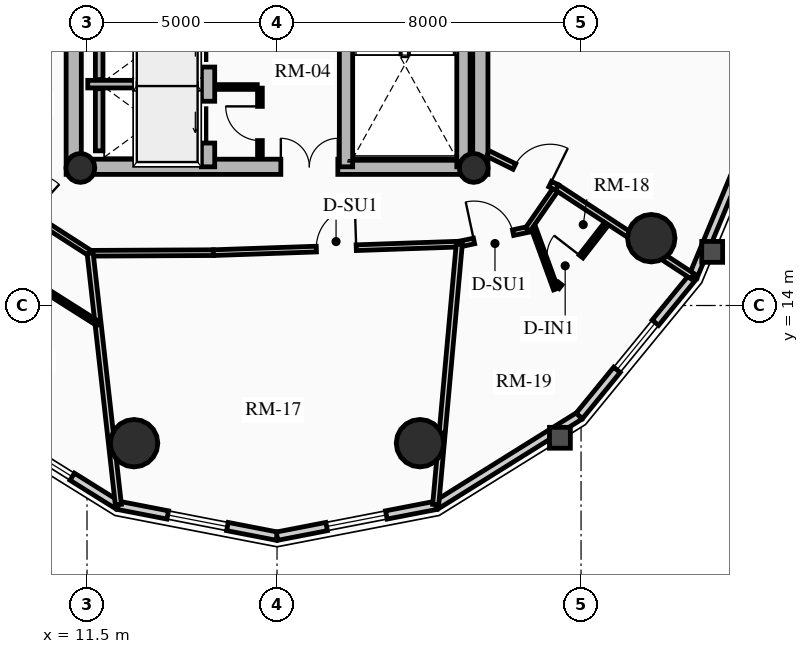
"""IFC4 building model, lengths in metres.
Left out: names, types, materials, properties, quantities, classifications, styles, units other than length and angle.
Written with IfcOpenShell. Run it as: python <this file> out.ifc"""

import sys

from ifc_helpers import new_model, si_unit, direction, frame, frame_2d, origin, origin_2d, place, context, subcontext, project, spatial, rectangle, circle, hollow_circle, extrude, source, transform, mapped, element, fill, save


model = new_model("IFC4")
c1 = context("Model", 3, precision=1e-05, world=origin(), true_north=direction((0.0, 1.0)))
c2 = subcontext(c1, "Body", "Model", "MODEL_VIEW")
j1 = project(units=[si_unit("LENGTHUNIT", "METRE"), si_unit("PLANEANGLEUNIT", "RADIAN")], contexts=[c1])
p1 = place(None, origin())
s1 = spatial("IfcSite", under=j1, at=p1, CompositionType="ELEMENT")
p2 = place(p1, origin())
s2 = spatial("IfcBuilding", under=s1, at=p2, CompositionType="ELEMENT")
p3 = place(p2, frame((0.0, 0.0, 174.88)))
s3 = spatial("IfcBuildingStorey", under=s2, at=p3, CompositionType="ELEMENT", Elevation=174.88)
for number, where, z_axis, x_axis in (
    (1, (11.15, 17.45, 0.0), (0.0, 0.0, 1.0), (0.0, 1.0, 0.0)),
    (2, (21.85, 17.45, 0.0), (0.0, 0.0, 1.0), (0.0, 1.0, 0.0)),
):
    element("IfcWall", number, at=place(p3, frame(where, z_axis=z_axis, x_axis=x_axis)), inside=s3, PredefinedType="SHEAR", context=c2, shape_type="SweptSolid", body=[
        extrude(rectangle(XDim=14.1, YDim=0.4, at=frame_2d((7.05, 0.0))), origin(), (0.0, 0.0, 1.0), 2.91),
    ])
p4 = place(p3, frame((11.15, 17.65, 0.0), z_axis=(0.0, 0.0, 1.0), x_axis=(1.0, 0.0, 0.0)))
e3 = element("IfcWall", 3, at=p4, inside=s3, PredefinedType="SHEAR", context=c2, shape_type="SweptSolid", body=[
    extrude(rectangle(XDim=10.7, YDim=0.4, at=frame_2d((5.35, 0.0))), origin(), (0.0, 0.0, 1.0), 2.91),
])
m1 = source(origin(), c2, "Body", "SweptSolid", [
    extrude(rectangle(XDim=1.5, YDim=2.02, at=frame_2d((0.75, 1.01))), frame((0.0, 0.21, 0.0), z_axis=(0.0, -1.0, 0.0), x_axis=(1.0, 0.0, 0.0)), (0.0, 0.0, 1.0), 0.42),
])
p5 = place(p4, frame((5.45, 0.0, 0.0)))
e4 = element("IfcOpeningElement", 4, at=p5, cuts=e3, PredefinedType="OPENING", context=c2, shape_type="MappedRepresentation", body=[
    mapped(m1, transform((0.0, 0.0, 0.0), x_axis=(1.0, 0.0, 0.0), y_axis=(0.0, 1.0, 0.0), z_axis=(0.0, 0.0, 1.0), scale=1.0)),
])
p6 = place(p3, frame((14.685, 17.65, 0.0), z_axis=(0.0, 0.0, 1.0), x_axis=(0.0, 1.0, 0.0)))
e5 = element("IfcWall", 5, at=p6, inside=s3, PredefinedType="SHEAR", context=c2, shape_type="SweptSolid", body=[
    extrude(rectangle(XDim=13.7, YDim=0.35, at=frame_2d((6.85, 0.0))), origin(), (0.0, 0.0, 1.0), 2.91),
])
m2 = source(origin(), c2, "Body", "SweptSolid", [
    extrude(rectangle(XDim=1.1, YDim=2.015, at=frame_2d((0.55, 1.007))), frame((0.0, 0.185, 0.0), z_axis=(0.0, -1.0, 0.0), x_axis=(1.0, 0.0, 0.0)), (0.0, 0.0, 1.0), 0.37),
])
p7 = place(p6, frame((4.85, 0.0, 0.0)))
e6 = element("IfcOpeningElement", 6, at=p7, cuts=e5, PredefinedType="OPENING", context=c2, shape_type="MappedRepresentation", body=[
    mapped(m2, transform((0.0, 0.0, 0.0), x_axis=(1.0, 0.0, 0.0), y_axis=(0.0, 1.0, 0.0), z_axis=(0.0, 0.0, 1.0), scale=1.0)),
])
p8 = place(p6, frame((0.625, 0.0, 0.0)))
e7 = element("IfcOpeningElement", 7, at=p8, cuts=e5, PredefinedType="OPENING", context=c2, shape_type="MappedRepresentation", body=[
    mapped(m2, transform((0.0, 0.0, 0.0), x_axis=(1.0, 0.0, 0.0), y_axis=(0.0, 1.0, 0.0), z_axis=(0.0, 0.0, 1.0), scale=1.0)),
])
p9 = place(p6, frame((2.625, 0.0, 0.0)))
e8 = element("IfcOpeningElement", 8, at=p9, cuts=e5, PredefinedType="OPENING", context=c2, shape_type="MappedRepresentation", body=[
    mapped(m2, transform((0.0, 0.0, 0.0), x_axis=(1.0, 0.0, 0.0), y_axis=(0.0, 1.0, 0.0), z_axis=(0.0, 0.0, 1.0), scale=1.0)),
])
m3 = source(origin(), c2, "Body", "SweptSolid", [
    extrude(rectangle(XDim=1.15, YDim=2.02, at=frame_2d((0.575, 1.01))), frame((0.0, 0.185, 0.0), z_axis=(0.0, -1.0, 0.0), x_axis=(1.0, 0.0, 0.0)), (0.0, 0.0, 1.0), 0.37),
])
p10 = place(p6, frame((7.27, 0.0, 0.0)))
e9 = element("IfcOpeningElement", 9, at=p10, cuts=e5, PredefinedType="OPENING", context=c2, shape_type="MappedRepresentation", body=[
    mapped(m3, transform((0.0, 0.0, 0.0), x_axis=(1.0, 0.0, 0.0), y_axis=(0.0, 1.0, 0.0), z_axis=(0.0, 0.0, 1.0), scale=1.0)),
])
p11 = place(p3, frame((18.315, 17.65, 0.0), z_axis=(0.0, 0.0, 1.0), x_axis=(0.0, 1.0, 0.0)))
e10 = element("IfcWall", 10, at=p11, inside=s3, PredefinedType="SHEAR", context=c2, shape_type="SweptSolid", body=[
    extrude(rectangle(XDim=9.6, YDim=0.35, at=frame_2d((4.8, 0.0))), origin(), (0.0, 0.0, 1.0), 2.91),
])
p12 = place(p11, frame((5.28, 0.0, 0.0)))
e11 = element("IfcOpeningElement", 11, at=p12, cuts=e10, PredefinedType="OPENING", context=c2, shape_type="MappedRepresentation", body=[
    mapped(m3, transform((0.0, 0.0, 0.0), x_axis=(1.0, 0.0, 0.0), y_axis=(0.0, 1.0, 0.0), z_axis=(0.0, 0.0, 1.0), scale=1.0)),
])
p13 = place(p3, frame((21.405, 17.65, 0.0), z_axis=(0.0, 0.0, 1.0), x_axis=(0.0, 1.0, 0.0)))
e12 = element("IfcWall", 12, at=p13, inside=s3, PredefinedType="SHEAR", context=c2, shape_type="SweptSolid", body=[
    extrude(rectangle(XDim=6.695, YDim=0.35, at=frame_2d((3.348, 0.0))), origin(), (0.0, 0.0, 1.0), 2.91),
])
for number, where, z_axis, x_axis in (
    (13, (11.325, 17.62, 0.0), (0.0, 0.0, 1.0), (1.0, 0.0, 0.0)),
    (14, (21.675, 17.62, 0.0), (0.0, 0.0, 1.0), (1.0, 0.0, 0.0)),
):
    element("IfcColumn", number, at=place(p3, frame(where, z_axis=z_axis, x_axis=x_axis)), inside=s3, PredefinedType="COLUMN", context=c2, shape_type="SweptSolid", body=[
        extrude(hollow_circle(Radius=0.38, WallThickness=0.032, at=origin_2d()), origin(), (0.0, 0.0, 1.0), 2.91),
    ])
for number, where, z_axis, x_axis in (
    (15, (12.739, 10.377, 0.0), (0.0, 0.0, 1.0), (1.0, 0.0, 0.0)),
    (16, (20.261, 10.377, 0.0), (0.0, 0.0, 1.0), (1.0, 0.0, 0.0)),
    (17, (26.347, 15.771, 0.0), (0.0, 0.0, 1.0), (1.0, 0.0, 0.0)),
):
    element("IfcColumn", number, at=place(p3, frame(where, z_axis=z_axis, x_axis=x_axis)), inside=s3, PredefinedType="USERDEFINED", context=c2, shape_type="SweptSolid", body=[
        extrude(circle(Radius=0.625, at=origin_2d()), origin(), (0.0, 0.0, 1.0), 2.91),
    ])
p14 = place(p3, frame((12.319, 8.741, 0.0), z_axis=(0.0, 0.0, 1.0), x_axis=(-0.848399108042, 0.529357113368, 0.0)))
e18 = element("IfcWall", 18, at=p14, inside=s3, PredefinedType="SOLIDWALL", context=c2, shape_type="SweptSolid", body=[
    extrude(rectangle(XDim=4.446, YDim=0.22, at=frame_2d((2.223, 0.0))), origin(), (0.0, 0.0, 1.0), 2.245),
])
m4 = source(origin(), c2, "Body", "SweptSolid", [
    extrude(rectangle(XDim=1.6, YDim=1.3, at=frame_2d((0.8, 0.65))), frame((0.0, 0.12, 0.0), z_axis=(0.0, -1.0, 0.0), x_axis=(1.0, 0.0, 0.0)), (0.0, 0.0, 1.0), 0.24),
])
p15 = place(p14, frame((1.423, 0.0, 0.65)))
e19 = element("IfcOpeningElement", 19, at=p15, cuts=e18, PredefinedType="OPENING", context=c2, shape_type="MappedRepresentation", body=[
    mapped(m4, transform((0.0, 0.0, 0.0), x_axis=(1.0, 0.0, 0.0), y_axis=(0.0, 1.0, 0.0), z_axis=(0.0, 0.0, 1.0), scale=1.0)),
])
p16 = place(p3, frame((16.5, 7.93, 0.0), z_axis=(0.0, 0.0, 1.0), x_axis=(-0.981703883443, 0.190413983815, 0.0)))
e20 = element("IfcWall", 20, at=p16, inside=s3, PredefinedType="SOLIDWALL", context=c2, shape_type="SweptSolid", body=[
    extrude(rectangle(XDim=4.259, YDim=0.22, at=frame_2d((2.13, 0.0))), origin(), (0.0, 0.0, 1.0), 2.245),
])
p17 = place(p16, frame((1.33, 0.0, 0.65)))
e21 = element("IfcOpeningElement", 21, at=p17, cuts=e20, PredefinedType="OPENING", context=c2, shape_type="MappedRepresentation", body=[
    mapped(m4, transform((0.0, 0.0, 0.0), x_axis=(1.0, 0.0, 0.0), y_axis=(0.0, 1.0, 0.0), z_axis=(0.0, 0.0, 1.0), scale=1.0)),
])
p18 = place(p3, frame((20.681, 8.741, 0.0), z_axis=(0.0, 0.0, 1.0), x_axis=(-0.981703883443, -0.190413983815, 0.0)))
e22 = element("IfcWall", 22, at=p18, inside=s3, PredefinedType="SOLIDWALL", context=c2, shape_type="SweptSolid", body=[
    extrude(rectangle(XDim=4.259, YDim=0.22, at=frame_2d((2.13, 0.0))), origin(), (0.0, 0.0, 1.0), 2.245),
])
p19 = place(p18, frame((1.33, 0.0, 0.65)))
e23 = element("IfcOpeningElement", 23, at=p19, cuts=e22, PredefinedType="OPENING", context=c2, shape_type="MappedRepresentation", body=[
    mapped(m4, transform((0.0, 0.0, 0.0), x_axis=(1.0, 0.0, 0.0), y_axis=(0.0, 1.0, 0.0), z_axis=(0.0, 0.0, 1.0), scale=1.0)),
])
p20 = place(p3, frame((24.453, 11.094, 0.0), z_axis=(0.0, 0.0, 1.0), x_axis=(-0.848399108042, -0.529357113368, 0.0)))
e24 = element("IfcWall", 24, at=p20, inside=s3, PredefinedType="SOLIDWALL", context=c2, shape_type="SweptSolid", body=[
    extrude(rectangle(XDim=4.446, YDim=0.22, at=frame_2d((2.223, 0.0))), origin(), (0.0, 0.0, 1.0), 2.245),
])
p21 = place(p3, frame((27.447, 14.76, 0.0), z_axis=(0.0, 0.0, 1.0), x_axis=(-0.632470615287, -0.774584353572, 0.0)))
e25 = element("IfcWall", 25, at=p21, inside=s3, PredefinedType="SOLIDWALL", context=c2, shape_type="SweptSolid", body=[
    extrude(rectangle(XDim=4.733, YDim=0.22, at=frame_2d((2.366, 0.0))), origin(), (0.0, 0.0, 1.0), 2.245),
])
p22 = place(p21, frame((1.566, 0.0, 0.65)))
e26 = element("IfcOpeningElement", 26, at=p22, cuts=e25, PredefinedType="OPENING", context=c2, shape_type="MappedRepresentation", body=[
    mapped(m4, transform((0.0, 0.0, 0.0), x_axis=(1.0, 0.0, 0.0), y_axis=(0.0, 1.0, 0.0), z_axis=(0.0, 0.0, 1.0), scale=1.0)),
])
p23 = place(p3, frame((29.369, 19.38, 0.0), z_axis=(0.0, 0.0, 1.0), x_axis=(-0.384144094086, -0.923273152961, 0.0)))
e27 = element("IfcWall", 27, at=p23, inside=s3, PredefinedType="SOLIDWALL", context=c2, shape_type="SweptSolid", body=[
    extrude(rectangle(XDim=5.003, YDim=0.22, at=frame_2d((2.501, 0.0))), origin(), (0.0, 0.0, 1.0), 2.245),
])
p24 = place(p3, frame((11.52, 19.825, 0.0), z_axis=(0.0, 0.0, 1.0), x_axis=(1.0, 0.0, 0.0)))
e28 = element("IfcWall", 28, at=p24, inside=s3, PredefinedType="SHEAR", context=c2, shape_type="SweptSolid", body=[
    extrude(rectangle(XDim=2.97, YDim=0.2, at=frame_2d((1.485, 0.0))), origin(), (0.0, 0.0, 1.0), 2.91),
])
p25 = place(p3, frame((11.82, 19.945, 0.0), z_axis=(0.0, 0.0, 1.0), x_axis=(0.0, 1.0, 0.0)))
e29 = element("IfcWall", 29, at=p25, inside=s3, PredefinedType="SHEAR", context=c2, shape_type="SweptSolid", body=[
    extrude(rectangle(XDim=1.735, YDim=0.2, at=frame_2d((0.867, 0.0))), origin(), (0.0, 0.0, 1.0), 2.91),
])
p26 = place(p3, frame((11.82, 18.07, 0.0), z_axis=(0.0, 0.0, 1.0), x_axis=(0.0, 1.0, 0.0)))
e30 = element("IfcWall", 30, at=p26, inside=s3, PredefinedType="SHEAR", context=c2, shape_type="SweptSolid", body=[
    extrude(rectangle(XDim=1.635, YDim=0.2, at=frame_2d((0.817, 0.0))), origin(), (0.0, 0.0, 1.0), 2.91),
])
p27 = place(p3, frame((16.05, 17.92, 0.0), z_axis=(0.0, 0.0, 1.0), x_axis=(0.0, 1.0, 0.0)))
e31 = element("IfcWall", 31, at=p27, inside=s3, PredefinedType="PARTITIONING", context=c2, shape_type="SweptSolid", body=[
    extrude(rectangle(XDim=1.8, YDim=0.125, at=frame_2d((0.9, 0.0))), origin(), (0.0, 0.0, 1.0), 2.675),
])
m5 = source(origin(), c2, "Body", "SweptSolid", [
    extrude(rectangle(XDim=0.9, YDim=2.005, at=frame_2d((0.45, 1.002))), frame((0.0, 0.073, 0.0), z_axis=(0.0, -1.0, 0.0), x_axis=(1.0, 0.0, 0.0)), (0.0, 0.0, 1.0), 0.145),
])
p28 = place(p27, frame((0.42, 0.0, 0.0)))
e32 = element("IfcOpeningElement", 32, at=p28, cuts=e31, PredefinedType="OPENING", context=c2, shape_type="MappedRepresentation", body=[
    mapped(m5, transform((0.0, 0.0, 0.0), x_axis=(1.0, 0.0, 0.0), y_axis=(0.0, 1.0, 0.0), z_axis=(0.0, 0.0, 1.0), scale=1.0)),
])
p29 = place(p3, frame((14.88, 19.75, 0.0), z_axis=(0.0, 0.0, 1.0), x_axis=(1.0, 0.0, 0.0)))
e33 = element("IfcWall", 33, at=p29, inside=s3, PredefinedType="PARTITIONING", context=c2, shape_type="SweptSolid", body=[
    extrude(rectangle(XDim=1.1, YDim=0.125, at=frame_2d((0.55, 0.0))), origin(), (0.0, 0.0, 1.0), 2.675),
])
p30 = place(p3, frame((10.277, 16.214, 0.0), z_axis=(0.0, 0.0, 1.0), x_axis=(0.841060909507, -0.540940427865, 0.0)))
e34 = element("IfcWall", 34, at=p30, inside=s3, PredefinedType="PARTITIONING", context=c2, shape_type="SweptSolid", body=[
    extrude(rectangle(XDim=1.552, YDim=0.15, at=frame_2d((0.776, 0.0))), origin(), (0.0, 0.0, 1.0), 2.245),
])
p31 = place(p3, frame((11.583, 15.375, 0.0), z_axis=(0.0, 0.0, 1.0), x_axis=(0.999988014548, 0.004895994347, 0.0)))
e35 = element("IfcWall", 35, at=p31, inside=s3, PredefinedType="PARTITIONING", context=c2, shape_type="SweptSolid", body=[
    extrude(rectangle(XDim=3.241, YDim=0.15, at=frame_2d((1.621, 0.0))), origin(), (0.0, 0.0, 1.0), 2.245),
])
p32 = place(p3, frame((14.824, 15.391, 0.0), z_axis=(0.0, 0.0, 1.0), x_axis=(0.999399579064, 0.034647963376, 0.0)))
e36 = element("IfcWall", 36, at=p32, inside=s3, PredefinedType="PARTITIONING", context=c2, shape_type="SweptSolid", body=[
    extrude(rectangle(XDim=6.476, YDim=0.15, at=frame_2d((3.238, 0.0))), origin(), (0.0, 0.0, 1.0), 2.245),
])
m6 = source(origin(), c2, "Body", "SweptSolid", [
    extrude(rectangle(XDim=1.05, YDim=2.015, at=frame_2d((0.525, 1.007))), frame((0.0, 0.085, 0.0), z_axis=(0.0, -1.0, 0.0), x_axis=(1.0, 0.0, 0.0)), (0.0, 0.0, 1.0), 0.17),
])
p33 = place(p32, frame((2.713, 0.0, 0.0)))
e37 = element("IfcOpeningElement", 37, at=p33, cuts=e36, PredefinedType="OPENING", context=c2, shape_type="MappedRepresentation", body=[
    mapped(m6, transform((0.0, 0.0, 0.0), x_axis=(1.0, 0.0, 0.0), y_axis=(0.0, 1.0, 0.0), z_axis=(0.0, 0.0, 1.0), scale=1.0)),
])
p34 = place(p3, frame((21.295, 15.615, 0.0), z_axis=(0.0, 0.0, 1.0), x_axis=(0.978043957244, 0.20839869889, 0.0)))
e38 = element("IfcWall", 38, at=p34, inside=s3, PredefinedType="PARTITIONING", context=c2, shape_type="SweptSolid", body=[
    extrude(rectangle(XDim=1.844, YDim=0.15, at=frame_2d((0.922, 0.0))), origin(), (0.0, 0.0, 1.0), 2.245),
])
p35 = place(p34, frame((0.397, 0.0, 0.0)))
e39 = element("IfcOpeningElement", 39, at=p35, cuts=e38, PredefinedType="OPENING", context=c2, shape_type="MappedRepresentation", body=[
    mapped(m6, transform((0.0, 0.0, 0.0), x_axis=(1.0, 0.0, 0.0), y_axis=(0.0, 1.0, 0.0), z_axis=(0.0, 0.0, 1.0), scale=1.0)),
])
p36 = place(p3, frame((23.099, 15.999, 0.0), z_axis=(0.0, 0.0, 1.0), x_axis=(0.570001625459, 0.821643564433, 0.0)))
e40 = element("IfcWall", 40, at=p36, inside=s3, PredefinedType="PARTITIONING", context=c2, shape_type="SweptSolid", body=[
    extrude(rectangle(XDim=1.347, YDim=0.15, at=frame_2d((0.673, 0.0))), origin(), (0.0, 0.0, 1.0), 2.245),
])
p37 = place(p3, frame((11.583, 15.375, 0.0), z_axis=(0.0, 0.0, 1.0), x_axis=(0.111538514066, -0.993760111838, 0.0)))
e41 = element("IfcWall", 41, at=p37, inside=s3, PredefinedType="PARTITIONING", context=c2, shape_type="SweptSolid", body=[
    extrude(rectangle(XDim=6.656, YDim=0.16, at=frame_2d((3.328, 0.0))), origin(), (0.0, 0.0, 1.0), 2.245),
])
p38 = place(p3, frame((21.295, 15.615, 0.0), z_axis=(0.0, 0.0, 1.0), x_axis=(-0.090129576558, -0.995930047458, 0.0)))
e42 = element("IfcWall", 42, at=p38, inside=s3, PredefinedType="PARTITIONING", context=c2, shape_type="SweptSolid", body=[
    extrude(rectangle(XDim=6.883, YDim=0.16, at=frame_2d((3.441, 0.0))), origin(), (0.0, 0.0, 1.0), 2.245),
])
p39 = place(p3, frame((23.866, 17.106, 0.0), z_axis=(0.0, 0.0, 1.0), x_axis=(0.836641352238, -0.547751081902, 0.0)))
e43 = element("IfcWall", 43, at=p39, inside=s3, PredefinedType="PARTITIONING", context=c2, shape_type="SweptSolid", body=[
    extrude(rectangle(XDim=4.26, YDim=0.16, at=frame_2d((2.13, 0.0))), origin(), (0.0, 0.0, 1.0), 2.245),
])
p40 = place(p3, frame((22.05, 18.0, 0.0), z_axis=(0.0, 0.0, 1.0), x_axis=(0.897159648657, -0.441706423795, 0.0)))
e44 = element("IfcWall", 44, at=p40, inside=s3, PredefinedType="PARTITIONING", context=c2, shape_type="SweptSolid", body=[
    extrude(rectangle(XDim=2.025, YDim=0.16, at=frame_2d((1.012, 0.0))), origin(), (0.0, 0.0, 1.0), 2.245),
])
m7 = source(origin(), c2, "Body", "SweptSolid", [
    extrude(rectangle(XDim=1.05, YDim=2.015, at=frame_2d((0.525, 1.007))), frame((0.0, 0.09, 0.0), z_axis=(0.0, -1.0, 0.0), x_axis=(1.0, 0.0, 0.0)), (0.0, 0.0, 1.0), 0.18),
])
p41 = place(p40, frame((0.775, 0.0, 0.0)))
e45 = element("IfcOpeningElement", 45, at=p41, cuts=e44, PredefinedType="OPENING", context=c2, shape_type="MappedRepresentation", body=[
    mapped(m7, transform((0.0, 0.0, 0.0), x_axis=(1.0, 0.0, 0.0), y_axis=(0.0, 1.0, 0.0), z_axis=(0.0, 0.0, 1.0), scale=1.0)),
])
p42 = place(p3, frame((9.796, 14.785, 0.0), z_axis=(0.0, 0.0, 1.0), x_axis=(0.844898543763, -0.534926584446, 0.0)))
e46 = element("IfcWall", 46, at=p42, inside=s3, PredefinedType="PARTITIONING", context=c2, shape_type="SweptSolid", body=[
    extrude(rectangle(XDim=2.361, YDim=0.125, at=frame_2d((1.18, 0.0))), origin(), (0.0, 0.0, 1.0), 2.245),
])
p43 = place(p3, frame((23.256, 16.018, 0.0), z_axis=(0.0, 0.0, 1.0), x_axis=(0.342788033774, -0.939412776101, 0.0)))
e47 = element("IfcWall", 47, at=p43, inside=s3, PredefinedType="PARTITIONING", context=c2, shape_type="SweptSolid", body=[
    extrude(rectangle(XDim=1.688, YDim=0.125, at=frame_2d((0.844, 0.0))), origin(), (0.0, 0.0, 1.0), 2.675),
])
p44 = place(p3, frame((23.875, 14.484, 0.0), z_axis=(0.0, 0.0, 1.0), x_axis=(0.61297586552, 0.790101631621, 0.0)))
e48 = element("IfcWall", 48, at=p44, inside=s3, PredefinedType="PARTITIONING", context=c2, shape_type="SweptSolid", body=[
    extrude(rectangle(XDim=2.103, YDim=0.125, at=frame_2d((1.052, 0.0))), origin(), (0.0, 0.0, 1.0), 2.245),
])
p45 = place(p44, frame((0.12, 0.0, 0.0)))
e49 = element("IfcOpeningElement", 49, at=p45, cuts=e48, PredefinedType="OPENING", context=c2, shape_type="MappedRepresentation", body=[
    mapped(m5, transform((0.0, 0.0, 0.0), x_axis=(1.0, 0.0, 0.0), y_axis=(0.0, 1.0, 0.0), z_axis=(0.0, 0.0, 1.0), scale=1.0)),
])
m8 = source(origin(), c2, "Body", "SweptSolid", [
    extrude(rectangle(XDim=1.6, YDim=1.3, at=frame_2d((0.8, 0.65))), frame((0.0, 0.03, 0.0), z_axis=(0.0, -1.0, 0.0), x_axis=(1.0, 0.0, 0.0)), (0.0, 0.0, 1.0), 0.06),
])
p46 = place(p15, origin())
e50 = element("IfcWindow", 50, at=p46, inside=s3, PartitioningType="SINGLE_PANEL", PredefinedType="WINDOW", context=c2, shape_type="MappedRepresentation", body=[
    mapped(m8, transform((0.0, 0.0, 0.0), x_axis=(1.0, 0.0, 0.0), y_axis=(0.0, 1.0, 0.0), z_axis=(0.0, 0.0, 1.0), scale=1.0)),
])
fill(e19, e50)
p47 = place(p17, origin())
e51 = element("IfcWindow", 51, at=p47, inside=s3, PartitioningType="SINGLE_PANEL", PredefinedType="WINDOW", context=c2, shape_type="MappedRepresentation", body=[
    mapped(m8, transform((0.0, 0.0, 0.0), x_axis=(1.0, 0.0, 0.0), y_axis=(0.0, 1.0, 0.0), z_axis=(0.0, 0.0, 1.0), scale=1.0)),
])
fill(e21, e51)
p48 = place(p19, origin())
e52 = element("IfcWindow", 52, at=p48, inside=s3, PartitioningType="SINGLE_PANEL", PredefinedType="WINDOW", context=c2, shape_type="MappedRepresentation", body=[
    mapped(m8, transform((0.0, 0.0, 0.0), x_axis=(1.0, 0.0, 0.0), y_axis=(0.0, 1.0, 0.0), z_axis=(0.0, 0.0, 1.0), scale=1.0)),
])
fill(e23, e52)
p49 = place(p22, origin())
e53 = element("IfcWindow", 53, at=p49, inside=s3, PartitioningType="SINGLE_PANEL", PredefinedType="WINDOW", context=c2, shape_type="MappedRepresentation", body=[
    mapped(m8, transform((0.0, 0.0, 0.0), x_axis=(1.0, 0.0, 0.0), y_axis=(0.0, 1.0, 0.0), z_axis=(0.0, 0.0, 1.0), scale=1.0)),
])
fill(e26, e53)
m9 = source(origin(), c2, "Body", "SweptSolid", [
    extrude(rectangle(XDim=1.1, YDim=2.015, at=frame_2d((0.55, 1.007))), frame((0.0, 0.025, 0.0), z_axis=(0.0, -1.0, 0.0), x_axis=(1.0, 0.0, 0.0)), (0.0, 0.0, 1.0), 0.05),
])
p50 = place(p8, origin())
e54 = element("IfcDoor", 54, at=p50, inside=s3, OperationType="SLIDING_TO_LEFT", PredefinedType="DOOR", context=c2, shape_type="MappedRepresentation", body=[
    mapped(m9, transform((0.0, 0.0, 0.0), x_axis=(1.0, 0.0, 0.0), y_axis=(0.0, 1.0, 0.0), z_axis=(0.0, 0.0, 1.0), scale=1.0)),
])
fill(e7, e54)
p51 = place(p9, origin())
e55 = element("IfcDoor", 55, at=p51, inside=s3, OperationType="SLIDING_TO_RIGHT", PredefinedType="DOOR", context=c2, shape_type="MappedRepresentation", body=[
    mapped(m9, transform((0.0, 0.0, 0.0), x_axis=(1.0, 0.0, 0.0), y_axis=(0.0, 1.0, 0.0), z_axis=(0.0, 0.0, 1.0), scale=1.0)),
])
fill(e8, e55)
m10 = source(origin(), c2, "Body", "SweptSolid", [
    extrude(rectangle(XDim=1.5, YDim=2.02, at=frame_2d((0.75, 1.01))), frame((0.0, 0.025, 0.0), z_axis=(0.0, -1.0, 0.0), x_axis=(1.0, 0.0, 0.0)), (0.0, 0.0, 1.0), 0.05),
])
p52 = place(p5, origin())
e56 = element("IfcDoor", 56, at=p52, inside=s3, OperationType="DOUBLE_DOOR_SINGLE_SWING", PredefinedType="DOOR", context=c2, shape_type="MappedRepresentation", body=[
    mapped(m10, transform((0.0, 0.0, 0.0), x_axis=(1.0, 0.0, 0.0), y_axis=(0.0, 1.0, 0.0), z_axis=(0.0, 0.0, 1.0), scale=1.0)),
])
fill(e4, e56)
m11 = source(origin(), c2, "Body", "SweptSolid", [
    extrude(rectangle(XDim=0.9, YDim=2.005, at=frame_2d((0.45, 1.002))), frame((0.0, 0.025, 0.0), z_axis=(0.0, -1.0, 0.0), x_axis=(1.0, 0.0, 0.0)), (0.0, 0.0, 1.0), 0.05),
])
p53 = place(p28, origin())
e57 = element("IfcDoor", 57, at=p53, inside=s3, OperationType="SINGLE_SWING_RIGHT", PredefinedType="DOOR", context=c2, shape_type="MappedRepresentation", body=[
    mapped(m11, transform((0.0, 0.0, 0.0), x_axis=(1.0, 0.0, 0.0), y_axis=(0.0, 1.0, 0.0), z_axis=(0.0, 0.0, 1.0), scale=1.0)),
])
fill(e32, e57)
m12 = source(origin(), c2, "Body", "SweptSolid", [
    extrude(rectangle(XDim=1.05, YDim=2.015, at=frame_2d((0.525, 1.007))), frame((0.0, 0.025, 0.0), z_axis=(0.0, -1.0, 0.0), x_axis=(1.0, 0.0, 0.0)), (0.0, 0.0, 1.0), 0.05),
])
p54 = place(p41, origin())
e58 = element("IfcDoor", 58, at=p54, inside=s3, OperationType="SINGLE_SWING_RIGHT", PredefinedType="DOOR", context=c2, shape_type="MappedRepresentation", body=[
    mapped(m12, transform((0.0, 0.0, 0.0), x_axis=(1.0, 0.0, 0.0), y_axis=(0.0, 1.0, 0.0), z_axis=(0.0, 0.0, 1.0), scale=1.0)),
])
fill(e45, e58)
p55 = place(p33, origin())
e59 = element("IfcDoor", 59, at=p55, inside=s3, OperationType="SINGLE_SWING_RIGHT", PredefinedType="DOOR", context=c2, shape_type="MappedRepresentation", body=[
    mapped(m12, transform((0.0, 0.0, 0.0), x_axis=(1.0, 0.0, 0.0), y_axis=(0.0, 1.0, 0.0), z_axis=(0.0, 0.0, 1.0), scale=1.0)),
])
fill(e37, e59)
p56 = place(p35, origin())
e60 = element("IfcDoor", 60, at=p56, inside=s3, OperationType="SINGLE_SWING_LEFT", PredefinedType="DOOR", context=c2, shape_type="MappedRepresentation", body=[
    mapped(m12, transform((0.0, 0.0, 0.0), x_axis=(1.0, 0.0, 0.0), y_axis=(0.0, 1.0, 0.0), z_axis=(0.0, 0.0, 1.0), scale=1.0)),
])
fill(e39, e60)
p57 = place(p45, origin())
e61 = element("IfcDoor", 61, at=p57, inside=s3, OperationType="SINGLE_SWING_RIGHT", PredefinedType="DOOR", context=c2, shape_type="MappedRepresentation", body=[
    mapped(m11, transform((0.0, 0.0, 0.0), x_axis=(1.0, 0.0, 0.0), y_axis=(0.0, 1.0, 0.0), z_axis=(0.0, 0.0, 1.0), scale=1.0)),
])
fill(e49, e61)
save(model, sys.argv[1])
